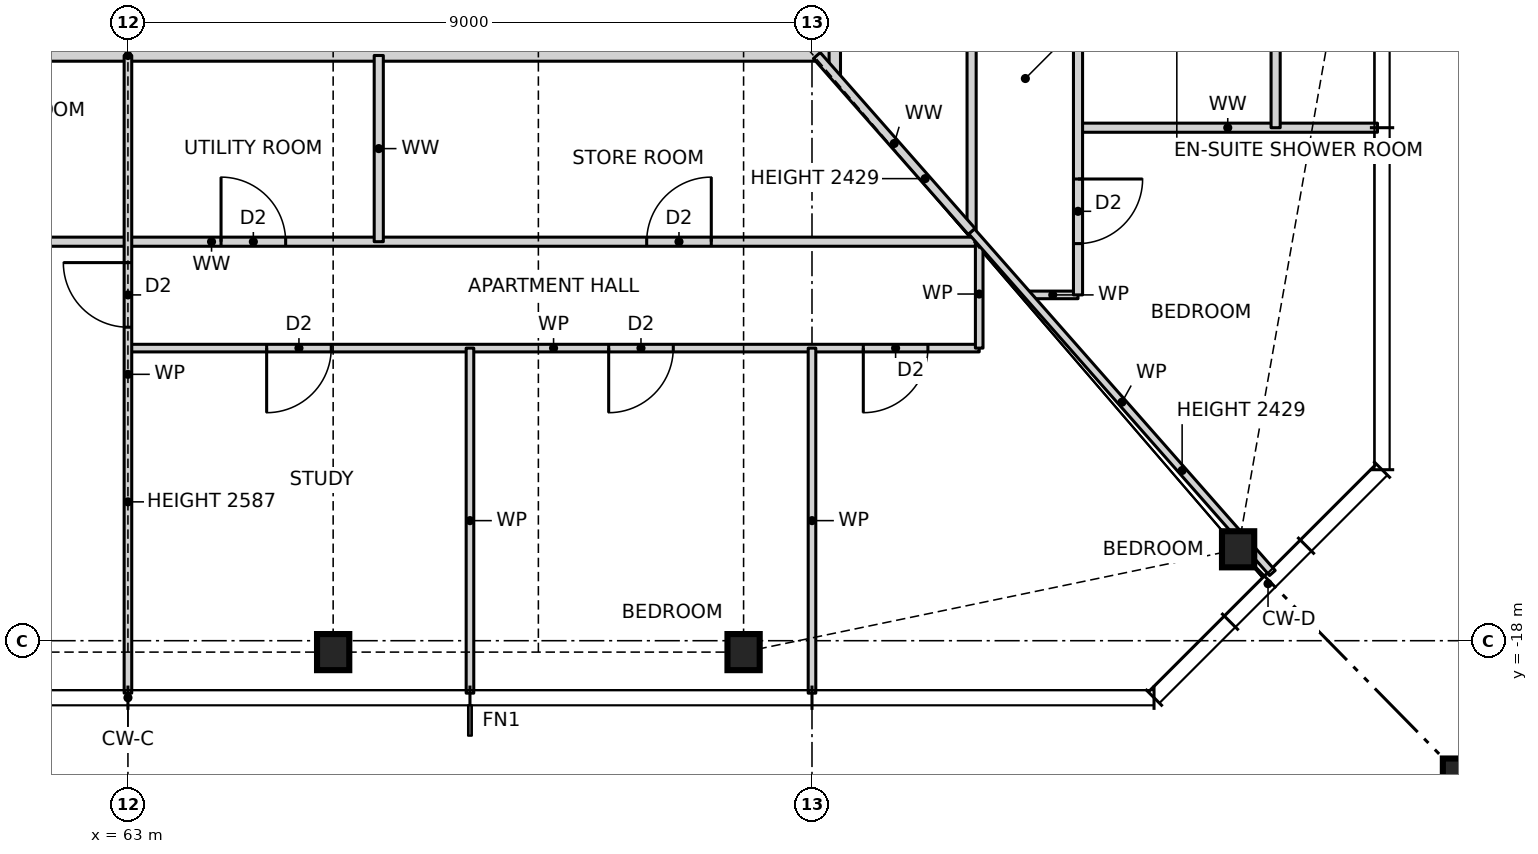
"""IFC4 building model, lengths in metres.
Left out: names, types, materials, properties, quantities, classifications, styles, units other than length and angle.
Written with IfcOpenShell. Run it as: python <this file> out.ifc"""

import sys

from ifc_helpers import new_model, si_unit, direction, frame, frame_2d, origin, origin_2d, place, context, subcontext, project, spatial, rectangle, hollow_rectangle, i_section, extrude, element, fill, save


model = new_model("IFC4")
c1 = context("Model", 3, precision=1e-05, world=origin(), true_north=direction((0.0, 1.0)))
c2 = subcontext(c1, "Body", "Model", "MODEL_VIEW")
j1 = project(units=[si_unit("LENGTHUNIT", "METRE"), si_unit("PLANEANGLEUNIT", "RADIAN")], contexts=[c1])
p1 = place(None, origin())
s1 = spatial("IfcSite", under=j1, at=p1, CompositionType="ELEMENT")
p2 = place(p1, origin())
s2 = spatial("IfcBuilding", under=s1, at=p2, CompositionType="ELEMENT")
p3 = place(p2, frame((0.0, 0.0, 39.5)))
s3 = spatial("IfcBuildingStorey", under=s2, at=p3, CompositionType="ELEMENT", Elevation=39.5)
for number, where, z_axis, x_axis in (
    (1, (65.7, -18.15, 0.0), (0.0, 0.0, 1.0), (1.0, 0.0, 0.0)),
    (2, (71.1, -18.15, 0.0), (0.0, 0.0, 1.0), (1.0, 0.0, 0.0)),
    (3, (77.606, -16.797, 0.0), (0.0, 0.0, 1.0), (1.0, 0.0, 0.0)),
):
    element("IfcColumn", number, at=place(p3, frame(where, z_axis=z_axis, x_axis=x_axis)), inside=s3, PredefinedType="COLUMN", context=c2, shape_type="SweptSolid", body=[
        extrude(i_section(OverallWidth=0.424, OverallDepth=0.475, WebThickness=0.048, FlangeThickness=0.077, at=origin_2d()), origin(), (0.0, 0.0, 1.0), 3.5),
    ])
p4 = place(p3, frame((80.9, -20.15, 0.0), z_axis=(0.0, 0.0, 1.0), x_axis=(1.0, 0.0, 0.0)))
e4 = element("IfcColumn", 4, at=p4, inside=s3, PredefinedType="COLUMN", context=c2, shape_type="SweptSolid", body=[
    extrude(hollow_rectangle(XDim=1.2, YDim=1.2, WallThickness=0.07, at=origin_2d()), origin(), (0.0, 0.0, 1.0), 3.5),
])
p5 = place(p3, frame((63.0, -14.15, 0.0), z_axis=(0.0, 0.0, 1.0), x_axis=(1.0, 0.0, 0.0)))
e5 = element("IfcWall", 5, at=p5, inside=s3, PredefinedType="PARTITIONING", context=c2, shape_type="SweptSolid", body=[
    extrude(rectangle(XDim=11.2, YDim=0.1, at=frame_2d((5.6, 0.0))), origin(), (0.0, 0.0, 1.0), 3.27),
])
p6 = place(p5, frame((1.825, 0.0, 0.0)))
e6 = element("IfcOpeningElement", 6, at=p6, cuts=e5, PredefinedType="OPENING", context=c2, shape_type="SweptSolid", body=[
    extrude(rectangle(XDim=0.85, YDim=2.1, at=frame_2d((0.425, 1.05))), frame((0.0, 0.06, 0.0), z_axis=(0.0, -1.0, 0.0), x_axis=(1.0, 0.0, 0.0)), (0.0, 0.0, 1.0), 0.12),
])
p7 = place(p5, frame((6.325, 0.0, 0.0)))
e7 = element("IfcOpeningElement", 7, at=p7, cuts=e5, PredefinedType="OPENING", context=c2, shape_type="SweptSolid", body=[
    extrude(rectangle(XDim=0.85, YDim=2.1, at=frame_2d((0.425, 1.05))), frame((0.0, 0.06, 0.0), z_axis=(0.0, -1.0, 0.0), x_axis=(1.0, 0.0, 0.0)), (0.0, 0.0, 1.0), 0.12),
])
p8 = place(p5, frame((9.675, 0.0, 0.0)))
e8 = element("IfcOpeningElement", 8, at=p8, cuts=e5, PredefinedType="OPENING", context=c2, shape_type="SweptSolid", body=[
    extrude(rectangle(XDim=0.85, YDim=2.1, at=frame_2d((0.425, 1.05))), frame((0.0, 0.06, 0.0), z_axis=(0.0, -1.0, 0.0), x_axis=(1.0, 0.0, 0.0)), (0.0, 0.0, 1.0), 0.12),
])
p9 = place(p3, frame((74.836, -13.45, 0.0), z_axis=(0.0, 0.0, 1.0), x_axis=(1.0, 0.0, 0.0)))
e9 = element("IfcWall", 9, at=p9, inside=s3, PredefinedType="PARTITIONING", context=c2, shape_type="SweptSolid", body=[
    extrude(rectangle(XDim=0.664, YDim=0.1, at=frame_2d((0.332, 0.0))), origin(), (0.0, 0.0, 1.0), 3.27),
])
p10 = place(p3, frame((54.0, -12.75, 0.0), z_axis=(0.0, 0.0, 1.0), x_axis=(1.0, 0.0, 0.0)))
e10 = element("IfcWall", 10, at=p10, inside=s3, PredefinedType="PARTITIONING", context=c2, shape_type="SweptSolid", body=[
    extrude(rectangle(XDim=20.2, YDim=0.12, at=frame_2d((10.1, 0.0))), origin(), (0.0, 0.0, 1.0), 3.27),
])
p11 = place(p10, frame((1.375, 0.0, 0.0)))
e11 = element("IfcOpeningElement", 11, at=p11, cuts=e10, PredefinedType="OPENING", context=c2, shape_type="SweptSolid", body=[
    extrude(rectangle(XDim=0.85, YDim=2.1, at=frame_2d((0.425, 1.05))), frame((0.0, 0.07, 0.0), z_axis=(0.0, -1.0, 0.0), x_axis=(1.0, 0.0, 0.0)), (0.0, 0.0, 1.0), 0.14),
])
p12 = place(p10, frame((4.575, 0.0, 0.0)))
e12 = element("IfcOpeningElement", 12, at=p12, cuts=e10, PredefinedType="OPENING", context=c2, shape_type="SweptSolid", body=[
    extrude(rectangle(XDim=0.85, YDim=2.1, at=frame_2d((0.425, 1.05))), frame((0.0, 0.07, 0.0), z_axis=(0.0, -1.0, 0.0), x_axis=(1.0, 0.0, 0.0)), (0.0, 0.0, 1.0), 0.14),
])
p13 = place(p10, frame((10.225, 0.0, 0.0)))
e13 = element("IfcOpeningElement", 13, at=p13, cuts=e10, PredefinedType="OPENING", context=c2, shape_type="SweptSolid", body=[
    extrude(rectangle(XDim=0.85, YDim=2.1, at=frame_2d((0.425, 1.05))), frame((0.0, 0.07, 0.0), z_axis=(0.0, -1.0, 0.0), x_axis=(1.0, 0.0, 0.0)), (0.0, 0.0, 1.0), 0.14),
])
p14 = place(p10, frame((15.825, 0.0, 0.0)))
e14 = element("IfcOpeningElement", 14, at=p14, cuts=e10, PredefinedType="OPENING", context=c2, shape_type="SweptSolid", body=[
    extrude(rectangle(XDim=0.85, YDim=2.1, at=frame_2d((0.425, 1.05))), frame((0.0, 0.07, 0.0), z_axis=(0.0, -1.0, 0.0), x_axis=(1.0, 0.0, 0.0)), (0.0, 0.0, 1.0), 0.14),
])
p15 = place(p3, frame((75.5, -11.25, 0.0), z_axis=(0.0, 0.0, 1.0), x_axis=(1.0, 0.0, 0.0)))
e15 = element("IfcWall", 15, at=p15, inside=s3, PredefinedType="PARTITIONING", context=c2, shape_type="SweptSolid", body=[
    extrude(rectangle(XDim=3.94, YDim=0.12, at=frame_2d((1.97, 0.0))), origin(), (0.0, 0.0, 1.0), 3.27),
])
p16 = place(p3, frame((53.7, -10.3, 0.0), z_axis=(0.0, 0.0, 1.0), x_axis=(1.0, 0.0, 0.0)))
e16 = element("IfcWall", 16, at=p16, inside=s3, PredefinedType="PARTITIONING", context=c2, shape_type="SweptSolid", body=[
    extrude(rectangle(XDim=18.6, YDim=0.15, at=frame_2d((9.3, 0.0))), origin(), (0.0, 0.0, 1.0), 3.27),
])
p17 = place(p16, frame((4.8, 0.0, 0.0)))
e17 = element("IfcOpeningElement", 17, at=p17, cuts=e16, PredefinedType="OPENING", context=c2, shape_type="SweptSolid", body=[
    extrude(rectangle(XDim=1.0, YDim=2.1, at=frame_2d((0.5, 1.05))), frame((0.0, 0.085, 0.0), z_axis=(0.0, -1.0, 0.0), x_axis=(1.0, 0.0, 0.0)), (0.0, 0.0, 1.0), 0.17),
])
p18 = place(p3, frame((78.1, -11.25, 0.0), z_axis=(0.0, 0.0, 1.0), x_axis=(0.0, 1.0, 0.0)))
e18 = element("IfcWall", 18, at=p18, inside=s3, PredefinedType="PARTITIONING", context=c2, shape_type="SweptSolid", body=[
    extrude(rectangle(XDim=2.4, YDim=0.12, at=frame_2d((1.2, 0.0))), origin(), (0.0, 0.0, 1.0), 3.27),
])
p19 = place(p3, frame((75.5, -13.45, 0.0), z_axis=(0.0, 0.0, 1.0), x_axis=(0.0, 1.0, 0.0)))
e19 = element("IfcWall", 19, at=p19, inside=s3, PredefinedType="PARTITIONING", context=c2, shape_type="SweptSolid", body=[
    extrude(rectangle(XDim=6.7, YDim=0.12, at=frame_2d((3.35, 0.0))), origin(), (0.0, 0.0, 1.0), 3.27),
])
p20 = place(p19, frame((5.225, 0.0, 0.0)))
e20 = element("IfcOpeningElement", 20, at=p20, cuts=e19, PredefinedType="OPENING", context=c2, shape_type="SweptSolid", body=[
    extrude(rectangle(XDim=0.85, YDim=2.1, at=frame_2d((0.425, 1.05))), frame((0.0, 0.07, 0.0), z_axis=(0.0, -1.0, 0.0), x_axis=(1.0, 0.0, 0.0)), (0.0, 0.0, 1.0), 0.14),
])
p21 = place(p19, frame((0.675, 0.0, 0.0)))
e21 = element("IfcOpeningElement", 21, at=p21, cuts=e19, PredefinedType="OPENING", context=c2, shape_type="SweptSolid", body=[
    extrude(rectangle(XDim=0.85, YDim=2.1, at=frame_2d((0.425, 1.05))), frame((0.0, 0.07, 0.0), z_axis=(0.0, -1.0, 0.0), x_axis=(1.0, 0.0, 0.0)), (0.0, 0.0, 1.0), 0.14),
])
p22 = place(p3, frame((74.2, -14.15, 0.0), z_axis=(0.0, 0.0, 1.0), x_axis=(0.0, 1.0, 0.0)))
e22 = element("IfcWall", 22, at=p22, inside=s3, PredefinedType="PARTITIONING", context=c2, shape_type="SweptSolid", body=[
    extrude(rectangle(XDim=1.423, YDim=0.1, at=frame_2d((0.711, 0.0))), origin(), (0.0, 0.0, 1.0), 3.27),
])
p23 = place(p3, frame((74.1, -12.614, 0.0), z_axis=(0.0, 0.0, 1.0), x_axis=(0.0, 1.0, 0.0)))
e23 = element("IfcWall", 23, at=p23, inside=s3, PredefinedType="PARTITIONING", context=c2, shape_type="SweptSolid", body=[
    extrude(rectangle(XDim=25.228, YDim=0.12, at=frame_2d((12.614, 0.0))), origin(), (0.0, 0.0, 1.0), 3.27),
])
p24 = place(p23, frame((7.239, 0.0, 0.0)))
e24 = element("IfcOpeningElement", 24, at=p24, cuts=e23, PredefinedType="OPENING", context=c2, shape_type="SweptSolid", body=[
    extrude(rectangle(XDim=0.85, YDim=2.1, at=frame_2d((0.425, 1.05))), frame((0.0, 0.07, 0.0), z_axis=(0.0, -1.0, 0.0), x_axis=(1.0, 0.0, 0.0)), (0.0, 0.0, 1.0), 0.14),
])
p25 = place(p23, frame((10.439, 0.0, 0.0)))
e25 = element("IfcOpeningElement", 25, at=p25, cuts=e23, PredefinedType="OPENING", context=c2, shape_type="SweptSolid", body=[
    extrude(rectangle(XDim=0.85, YDim=2.1, at=frame_2d((0.425, 1.05))), frame((0.0, 0.07, 0.0), z_axis=(0.0, -1.0, 0.0), x_axis=(1.0, 0.0, 0.0)), (0.0, 0.0, 1.0), 0.14),
])
p26 = place(p23, frame((2.507, 0.0, 0.0)))
e26 = element("IfcOpeningElement", 26, at=p26, cuts=e23, PredefinedType="OPENING", context=c2, shape_type="SweptSolid", body=[
    extrude(rectangle(XDim=0.85, YDim=2.1, at=frame_2d((0.425, 1.05))), frame((0.0, 0.07, 0.0), z_axis=(0.0, -1.0, 0.0), x_axis=(1.0, 0.0, 0.0)), (0.0, 0.0, 1.0), 0.14),
])
p27 = place(p23, frame((16.639, 0.0, 0.0)))
e27 = element("IfcOpeningElement", 27, at=p27, cuts=e23, PredefinedType="OPENING", context=c2, shape_type="SweptSolid", body=[
    extrude(rectangle(XDim=0.85, YDim=2.1, at=frame_2d((0.425, 1.05))), frame((0.0, 0.07, 0.0), z_axis=(0.0, -1.0, 0.0), x_axis=(1.0, 0.0, 0.0)), (0.0, 0.0, 1.0), 0.14),
])
p28 = place(p23, frame((21.821, 0.0, 0.0)))
e28 = element("IfcOpeningElement", 28, at=p28, cuts=e23, PredefinedType="OPENING", context=c2, shape_type="SweptSolid", body=[
    extrude(rectangle(XDim=0.85, YDim=2.1, at=frame_2d((0.425, 1.05))), frame((0.0, 0.07, 0.0), z_axis=(0.0, -1.0, 0.0), x_axis=(1.0, 0.0, 0.0)), (0.0, 0.0, 1.0), 0.14),
])
p29 = place(p3, frame((72.3, -10.568, 0.0), z_axis=(0.0, 0.0, 1.0), x_axis=(0.0, 1.0, 0.0)))
e29 = element("IfcWall", 29, at=p29, inside=s3, PredefinedType="PARTITIONING", context=c2, shape_type="SweptSolid", body=[
    extrude(rectangle(XDim=21.468, YDim=0.15, at=frame_2d((10.734, 0.0))), origin(), (0.0, 0.0, 1.0), 3.27),
])
p30 = place(p29, frame((8.318, 0.0, 0.0)))
e30 = element("IfcOpeningElement", 30, at=p30, cuts=e29, PredefinedType="OPENING", context=c2, shape_type="SweptSolid", body=[
    extrude(rectangle(XDim=1.0, YDim=2.1, at=frame_2d((0.5, 1.05))), frame((0.0, 0.085, 0.0), z_axis=(0.0, -1.0, 0.0), x_axis=(1.0, 0.0, 0.0)), (0.0, 0.0, 1.0), 0.17),
])
for number, where, z_axis, x_axis in (
    (31, (72.0, -18.69, 0.0), (0.0, 0.0, 1.0), (0.0, 1.0, 0.0)),
    (32, (67.5, -18.69, 0.0), (0.0, 0.0, 1.0), (0.0, 1.0, 0.0)),
):
    element("IfcWall", number, at=place(p3, frame(where, z_axis=z_axis, x_axis=x_axis)), inside=s3, PredefinedType="PARTITIONING", context=c2, shape_type="SweptSolid", body=[
        extrude(rectangle(XDim=4.54, YDim=0.1, at=frame_2d((2.27, 0.0))), origin(), (0.0, 0.0, 1.0), 3.27),
    ])
p31 = place(p3, frame((66.3, -12.75, 0.0), z_axis=(0.0, 0.0, 1.0), x_axis=(0.0, 1.0, 0.0)))
e33 = element("IfcWall", 33, at=p31, inside=s3, PredefinedType="PARTITIONING", context=c2, shape_type="SweptSolid", body=[
    extrude(rectangle(XDim=2.45, YDim=0.12, at=frame_2d((1.225, 0.0))), origin(), (0.0, 0.0, 1.0), 3.27),
])
p32 = place(p3, frame((63.0, -18.69, 0.0), z_axis=(0.0, 0.0, 1.0), x_axis=(0.0, 1.0, 0.0)))
e34 = element("IfcWall", 34, at=p32, inside=s3, PredefinedType="PARTITIONING", context=c2, shape_type="SweptSolid", body=[
    extrude(rectangle(XDim=8.39, YDim=0.1, at=frame_2d((4.195, 0.0))), origin(), (0.0, 0.0, 1.0), 2.587),
])
p33 = place(p32, frame((4.815, 0.0, 0.0)))
e35 = element("IfcOpeningElement", 35, at=p33, cuts=e34, PredefinedType="OPENING", context=c2, shape_type="SweptSolid", body=[
    extrude(rectangle(XDim=0.85, YDim=2.1, at=frame_2d((0.425, 1.05))), frame((0.0, 0.06, 0.0), z_axis=(0.0, -1.0, 0.0), x_axis=(1.0, 0.0, 0.0)), (0.0, 0.0, 1.0), 0.12),
])
p34 = place(p3, frame((78.057, -17.109, 0.0), z_axis=(0.0, 0.0, 1.0), x_axis=(-0.660775837956, 0.750583301156, 0.0)))
e36 = element("IfcWall", 36, at=p34, inside=s3, PredefinedType="PARTITIONING", context=c2, shape_type="SweptSolid", body=[
    extrude(rectangle(XDim=5.989, YDim=0.1, at=frame_2d((2.994, 0.0))), origin(), (0.0, 0.0, 1.0), 2.429),
])
p35 = place(p3, frame((74.1, -12.614, 0.0), z_axis=(0.0, 0.0, 1.0), x_axis=(-0.660767161141, 0.750590939699, 0.0)))
e37 = element("IfcWall", 37, at=p35, inside=s3, PredefinedType="PARTITIONING", context=c2, shape_type="SweptSolid", body=[
    extrude(rectangle(XDim=3.082, YDim=0.12, at=frame_2d((1.541, 0.0))), origin(), (0.0, 0.0, 1.0), 2.429),
])
p36 = place(p33, origin())
e38 = element("IfcDoor", 38, at=p36, inside=s3, OperationType="SINGLE_SWING_RIGHT", PredefinedType="DOOR", context=c2, shape_type="SweptSolid", body=[
    extrude(rectangle(XDim=0.85, YDim=2.1, at=frame_2d((0.425, 1.05))), frame((0.0, 0.025, 0.0), z_axis=(0.0, -1.0, 0.0), x_axis=(1.0, 0.0, 0.0)), (0.0, 0.0, 1.0), 0.05),
])
fill(e35, e38)
p37 = place(p6, frame((0.85, 0.0, 0.0), z_axis=(0.0, 0.0, 1.0), x_axis=(-1.0, 0.0, 0.0)))
e39 = element("IfcDoor", 39, at=p37, inside=s3, OperationType="SINGLE_SWING_RIGHT", PredefinedType="DOOR", context=c2, shape_type="SweptSolid", body=[
    extrude(rectangle(XDim=0.85, YDim=2.1, at=frame_2d((0.425, 1.05))), frame((0.0, 0.025, 0.0), z_axis=(0.0, -1.0, 0.0), x_axis=(1.0, 0.0, 0.0)), (0.0, 0.0, 1.0), 0.05),
])
fill(e6, e39)
p38 = place(p7, frame((0.85, 0.0, 0.0), z_axis=(0.0, 0.0, 1.0), x_axis=(-1.0, 0.0, 0.0)))
e40 = element("IfcDoor", 40, at=p38, inside=s3, OperationType="SINGLE_SWING_RIGHT", PredefinedType="DOOR", context=c2, shape_type="SweptSolid", body=[
    extrude(rectangle(XDim=0.85, YDim=2.1, at=frame_2d((0.425, 1.05))), frame((0.0, 0.025, 0.0), z_axis=(0.0, -1.0, 0.0), x_axis=(1.0, 0.0, 0.0)), (0.0, 0.0, 1.0), 0.05),
])
fill(e7, e40)
p39 = place(p8, frame((0.85, 0.0, 0.0), z_axis=(0.0, 0.0, 1.0), x_axis=(-1.0, 0.0, 0.0)))
e41 = element("IfcDoor", 41, at=p39, inside=s3, OperationType="SINGLE_SWING_RIGHT", PredefinedType="DOOR", context=c2, shape_type="SweptSolid", body=[
    extrude(rectangle(XDim=0.85, YDim=2.1, at=frame_2d((0.425, 1.05))), frame((0.0, 0.025, 0.0), z_axis=(0.0, -1.0, 0.0), x_axis=(1.0, 0.0, 0.0)), (0.0, 0.0, 1.0), 0.05),
])
fill(e8, e41)
p40 = place(p13, origin())
e42 = element("IfcDoor", 42, at=p40, inside=s3, OperationType="SINGLE_SWING_LEFT", PredefinedType="DOOR", context=c2, shape_type="SweptSolid", body=[
    extrude(rectangle(XDim=0.85, YDim=2.1, at=frame_2d((0.425, 1.05))), frame((0.0, 0.025, 0.0), z_axis=(0.0, -1.0, 0.0), x_axis=(1.0, 0.0, 0.0)), (0.0, 0.0, 1.0), 0.05),
])
fill(e13, e42)
p41 = place(p14, origin())
e43 = element("IfcDoor", 43, at=p41, inside=s3, OperationType="SINGLE_SWING_RIGHT", PredefinedType="DOOR", context=c2, shape_type="SweptSolid", body=[
    extrude(rectangle(XDim=0.85, YDim=2.1, at=frame_2d((0.425, 1.05))), frame((0.0, 0.025, 0.0), z_axis=(0.0, -1.0, 0.0), x_axis=(1.0, 0.0, 0.0)), (0.0, 0.0, 1.0), 0.05),
])
fill(e14, e43)
p42 = place(p21, frame((0.85, 0.0, 0.0), z_axis=(0.0, 0.0, 1.0), x_axis=(-1.0, 0.0, 0.0)))
e44 = element("IfcDoor", 44, at=p42, inside=s3, OperationType="SINGLE_SWING_LEFT", PredefinedType="DOOR", context=c2, shape_type="SweptSolid", body=[
    extrude(rectangle(XDim=0.85, YDim=2.1, at=frame_2d((0.425, 1.05))), frame((0.0, 0.025, 0.0), z_axis=(0.0, -1.0, 0.0), x_axis=(1.0, 0.0, 0.0)), (0.0, 0.0, 1.0), 0.05),
])
fill(e21, e44)
save(model, sys.argv[1])
